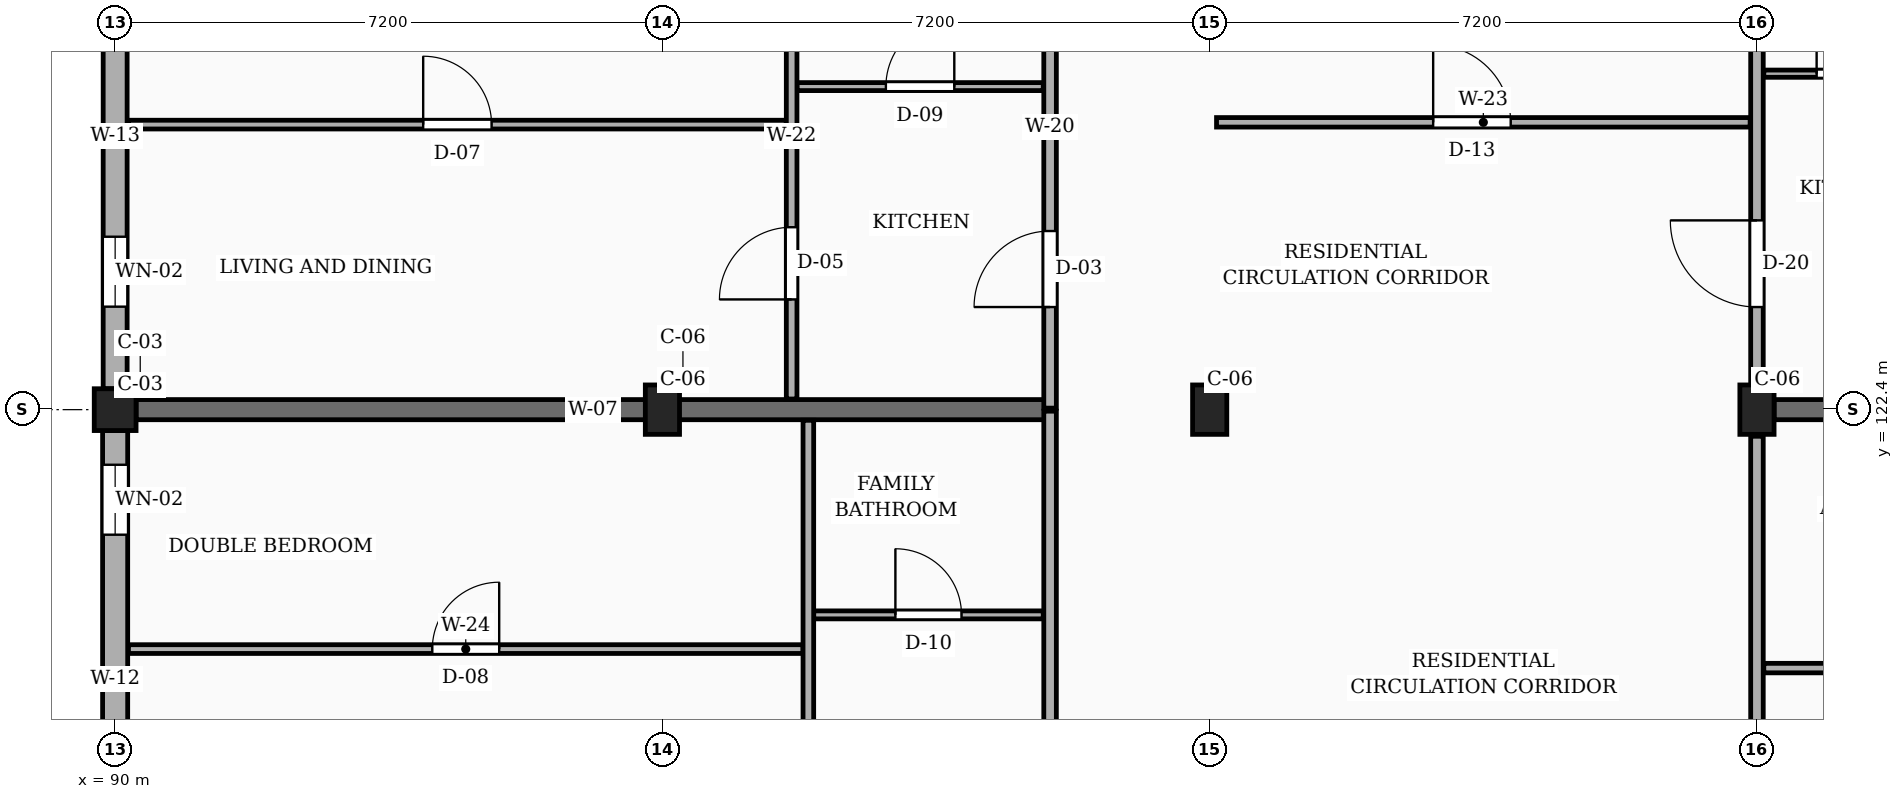
"""IFC4 building model, lengths in metres.
Left out: names, types, materials, properties, quantities, classifications, styles, units other than length and angle.
Written with IfcOpenShell. Run it as: python <this file> out.ifc"""

import sys

from ifc_helpers import new_model, si_unit, direction, frame, frame_2d, origin, origin_2d, place, context, subcontext, project, spatial, rectangle, extrude, element, fill, save


model = new_model("IFC4")
c1 = context("Model", 3, precision=1e-05, world=origin(), true_north=direction((0.0, 1.0)))
c2 = subcontext(c1, "Body", "Model", "MODEL_VIEW")
j1 = project(units=[si_unit("LENGTHUNIT", "METRE"), si_unit("PLANEANGLEUNIT", "RADIAN")], contexts=[c1])
p1 = place(None, origin())
s1 = spatial("IfcSite", under=j1, at=p1, CompositionType="ELEMENT")
p2 = place(p1, origin())
s2 = spatial("IfcBuilding", under=s1, at=p2, CompositionType="ELEMENT")
p3 = place(p2, frame((0.0, 0.0, 10.8)))
s3 = spatial("IfcBuildingStorey", under=s2, at=p3, CompositionType="ELEMENT", Elevation=10.8)
p4 = place(p3, frame((90.0, 122.4, 0.0), z_axis=(0.0, 0.0, 1.0), x_axis=(1.0, 0.0, 0.0)))
e1 = element("IfcColumn", 1, at=p4, inside=s3, PredefinedType="COLUMN", context=c2, shape_type="SweptSolid", body=[
    extrude(rectangle(XDim=0.55, YDim=0.55, at=origin_2d()), origin(), (0.0, 0.0, 1.0), 3.15),
])
for number, where, z_axis, x_axis in (
    (2, (97.2, 122.4, 0.0), (0.0, 0.0, 1.0), (1.0, 0.0, 0.0)),
    (3, (104.4, 122.4, 0.0), (0.0, 0.0, 1.0), (1.0, 0.0, 0.0)),
    (4, (111.6, 122.4, 0.0), (0.0, 0.0, 1.0), (1.0, 0.0, 0.0)),
):
    element("IfcColumn", number, at=place(p3, frame(where, z_axis=z_axis, x_axis=x_axis)), inside=s3, PredefinedType="COLUMN", context=c2, shape_type="SweptSolid", body=[
        extrude(rectangle(XDim=0.45, YDim=0.65, at=origin_2d()), origin(), (0.0, 0.0, 1.0), 3.15),
    ])
p5 = place(p3, frame((90.275, 122.4, 0.0), z_axis=(0.0, 0.0, 1.0), x_axis=(1.0, 0.0, 0.0)))
e5 = element("IfcWall", 5, at=p5, inside=s3, PredefinedType="SOLIDWALL", context=c2, shape_type="SweptSolid", body=[
    extrude(rectangle(XDim=12.025, YDim=0.265, at=frame_2d((6.013, 0.0))), origin(), (0.0, 0.0, 1.0), 2.19),
])
p6 = place(p3, frame((111.825, 122.4, 0.0), z_axis=(0.0, 0.0, 1.0), x_axis=(1.0, 0.0, 0.0)))
e6 = element("IfcWall", 6, at=p6, inside=s3, PredefinedType="SOLIDWALL", context=c2, shape_type="SweptSolid", body=[
    extrude(rectangle(XDim=6.7, YDim=0.265, at=frame_2d((3.35, 0.0))), origin(), (0.0, 0.0, 1.0), 2.19),
])
p7 = place(p3, frame((90.0, 129.325, 0.0), z_axis=(0.0, 0.0, 1.0), x_axis=(0.0, -1.0, 0.0)))
e7 = element("IfcWall", 7, at=p7, inside=s3, PredefinedType="SOLIDWALL", context=c2, shape_type="SweptSolid", body=[
    extrude(rectangle(XDim=6.65, YDim=0.315, at=frame_2d((3.325, 0.0))), origin(), (0.0, 0.0, 1.0), 2.46),
])
p8 = place(p7, frame((0.45, 0.0, 0.78)))
e8 = element("IfcOpeningElement", 8, at=p8, cuts=e7, PredefinedType="OPENING", context=c2, shape_type="SweptSolid", body=[
    extrude(rectangle(XDim=1.45, YDim=1.44, at=frame_2d((0.725, 0.72))), frame((0.0, 0.167, 0.0), z_axis=(0.0, -1.0, 0.0), x_axis=(1.0, 0.0, 0.0)), (0.0, 0.0, 1.0), 0.335),
])
p9 = place(p7, frame((4.65, 0.0, 0.78)))
e9 = element("IfcOpeningElement", 9, at=p9, cuts=e7, PredefinedType="OPENING", context=c2, shape_type="SweptSolid", body=[
    extrude(rectangle(XDim=0.92, YDim=1.15, at=frame_2d((0.46, 0.575))), frame((0.0, 0.167, 0.0), z_axis=(0.0, -1.0, 0.0), x_axis=(1.0, 0.0, 0.0)), (0.0, 0.0, 1.0), 0.335),
])
p10 = place(p3, frame((90.0, 122.125, 0.0), z_axis=(0.0, 0.0, 1.0), x_axis=(0.0, -1.0, 0.0)))
e10 = element("IfcWall", 10, at=p10, inside=s3, PredefinedType="SOLIDWALL", context=c2, shape_type="SweptSolid", body=[
    extrude(rectangle(XDim=6.65, YDim=0.33, at=frame_2d((3.325, 0.0))), origin(), (0.0, 0.0, 1.0), 2.46),
])
p11 = place(p10, frame((0.45, 0.0, 0.78)))
e11 = element("IfcOpeningElement", 11, at=p11, cuts=e10, PredefinedType="OPENING", context=c2, shape_type="SweptSolid", body=[
    extrude(rectangle(XDim=0.92, YDim=1.15, at=frame_2d((0.46, 0.575))), frame((0.0, 0.175, 0.0), z_axis=(0.0, -1.0, 0.0), x_axis=(1.0, 0.0, 0.0)), (0.0, 0.0, 1.0), 0.35),
])
p12 = place(p10, frame((4.65, 0.0, 0.78)))
e12 = element("IfcOpeningElement", 12, at=p12, cuts=e10, PredefinedType="OPENING", context=c2, shape_type="SweptSolid", body=[
    extrude(rectangle(XDim=1.08, YDim=1.15, at=frame_2d((0.54, 0.575))), frame((0.0, 0.175, 0.0), z_axis=(0.0, -1.0, 0.0), x_axis=(1.0, 0.0, 0.0)), (0.0, 0.0, 1.0), 0.35),
])
p13 = place(p3, frame((102.3, 115.22, 0.0), z_axis=(0.0, 0.0, 1.0), x_axis=(0.0, 1.0, 0.0)))
e13 = element("IfcWall", 13, at=p13, inside=s3, PredefinedType="PARTITIONING", context=c2, shape_type="SweptSolid", body=[
    extrude(rectangle(XDim=7.16, YDim=0.165, at=frame_2d((3.58, 0.0))), origin(), (0.0, 0.0, 1.0), 2.325),
])
p14 = place(p13, frame((1.33, 0.0, 0.0)))
e14 = element("IfcOpeningElement", 14, at=p14, cuts=e13, PredefinedType="OPENING", context=c2, shape_type="SweptSolid", body=[
    extrude(rectangle(XDim=1.14, YDim=2.18, at=frame_2d((0.57, 1.09))), frame((0.0, 0.093, 0.0), z_axis=(0.0, -1.0, 0.0), x_axis=(1.0, 0.0, 0.0)), (0.0, 0.0, 1.0), 0.185),
])
p15 = place(p3, frame((102.3, 122.42, 0.0), z_axis=(0.0, 0.0, 1.0), x_axis=(0.0, 1.0, 0.0)))
e15 = element("IfcWall", 15, at=p15, inside=s3, PredefinedType="PARTITIONING", context=c2, shape_type="SweptSolid", body=[
    extrude(rectangle(XDim=7.16, YDim=0.165, at=frame_2d((3.58, 0.0))), origin(), (0.0, 0.0, 1.0), 2.325),
])
p16 = place(p15, frame((1.33, 0.0, 0.0)))
e16 = element("IfcOpeningElement", 16, at=p16, cuts=e15, PredefinedType="OPENING", context=c2, shape_type="SweptSolid", body=[
    extrude(rectangle(XDim=1.0, YDim=2.15, at=frame_2d((0.5, 1.075))), frame((0.0, 0.093, 0.0), z_axis=(0.0, -1.0, 0.0), x_axis=(1.0, 0.0, 0.0)), (0.0, 0.0, 1.0), 0.185),
])
p17 = place(p3, frame((111.6, 115.55, 0.0), z_axis=(0.0, 0.0, 1.0), x_axis=(0.0, 1.0, 0.0)))
e17 = element("IfcWall", 17, at=p17, inside=s3, PredefinedType="PARTITIONING", context=c2, shape_type="SweptSolid", body=[
    extrude(rectangle(XDim=6.5, YDim=0.165, at=frame_2d((3.25, 0.0))), origin(), (0.0, 0.0, 1.0), 2.24),
])
p18 = place(p17, frame((1.1, 0.0, 0.0)))
e18 = element("IfcOpeningElement", 18, at=p18, cuts=e17, PredefinedType="OPENING", context=c2, shape_type="SweptSolid", body=[
    extrude(rectangle(XDim=0.94, YDim=2.12, at=frame_2d((0.47, 1.06))), frame((0.0, 0.093, 0.0), z_axis=(0.0, -1.0, 0.0), x_axis=(1.0, 0.0, 0.0)), (0.0, 0.0, 1.0), 0.185),
])
p19 = place(p3, frame((111.6, 122.75, 0.0), z_axis=(0.0, 0.0, 1.0), x_axis=(0.0, 1.0, 0.0)))
e19 = element("IfcWall", 19, at=p19, inside=s3, PredefinedType="PARTITIONING", context=c2, shape_type="SweptSolid", body=[
    extrude(rectangle(XDim=6.5, YDim=0.165, at=frame_2d((3.25, 0.0))), origin(), (0.0, 0.0, 1.0), 2.24),
])
p20 = place(p19, frame((1.0, 0.0, 0.0)))
e20 = element("IfcOpeningElement", 20, at=p20, cuts=e19, PredefinedType="OPENING", context=c2, shape_type="SweptSolid", body=[
    extrude(rectangle(XDim=1.14, YDim=2.18, at=frame_2d((0.57, 1.09))), frame((0.0, 0.093, 0.0), z_axis=(0.0, -1.0, 0.0), x_axis=(1.0, 0.0, 0.0)), (0.0, 0.0, 1.0), 0.185),
])
p21 = place(p3, frame((90.175, 119.25, 0.0), z_axis=(0.0, 0.0, 1.0), x_axis=(1.0, 0.0, 0.0)))
e21 = element("IfcWall", 21, at=p21, inside=s3, PredefinedType="PARTITIONING", context=c2, shape_type="SweptSolid", body=[
    extrude(rectangle(XDim=8.875, YDim=0.115, at=frame_2d((4.438, 0.0))), origin(), (0.0, 0.0, 1.0), 2.325),
])
p22 = place(p21, frame((3.998, 0.0, 0.0)))
e22 = element("IfcOpeningElement", 22, at=p22, cuts=e21, PredefinedType="OPENING", context=c2, shape_type="SweptSolid", body=[
    extrude(rectangle(XDim=0.88, YDim=2.08, at=frame_2d((0.44, 1.04))), frame((0.0, 0.067, 0.0), z_axis=(0.0, -1.0, 0.0), x_axis=(1.0, 0.0, 0.0)), (0.0, 0.0, 1.0), 0.135),
])
p23 = place(p3, frame((99.19, 119.7, 0.0), z_axis=(0.0, 0.0, 1.0), x_axis=(1.0, 0.0, 0.0)))
e23 = element("IfcWall", 23, at=p23, inside=s3, PredefinedType="PARTITIONING", context=c2, shape_type="SweptSolid", body=[
    extrude(rectangle(XDim=3.02, YDim=0.105, at=frame_2d((1.51, 0.0))), origin(), (0.0, 0.0, 1.0), 2.325),
])
p24 = place(p23, frame((1.075, 0.0, 0.0)))
e24 = element("IfcOpeningElement", 24, at=p24, cuts=e23, PredefinedType="OPENING", context=c2, shape_type="SweptSolid", body=[
    extrude(rectangle(XDim=0.87, YDim=2.05, at=frame_2d((0.435, 1.025))), frame((0.0, 0.062, 0.0), z_axis=(0.0, -1.0, 0.0), x_axis=(1.0, 0.0, 0.0)), (0.0, 0.0, 1.0), 0.125),
])
p25 = place(p3, frame((99.12, 115.34, 0.0), z_axis=(0.0, 0.0, 1.0), x_axis=(0.0, 1.0, 0.0)))
e25 = element("IfcWall", 25, at=p25, inside=s3, PredefinedType="PARTITIONING", context=c2, shape_type="SweptSolid", body=[
    extrude(rectangle(XDim=6.92, YDim=0.14, at=frame_2d((3.46, 0.0))), origin(), (0.0, 0.0, 1.0), 2.325),
])
p26 = place(p25, frame((1.31, 0.0, 0.0)))
e26 = element("IfcOpeningElement", 26, at=p26, cuts=e25, PredefinedType="OPENING", context=c2, shape_type="SweptSolid", body=[
    extrude(rectangle(XDim=0.92, YDim=2.1, at=frame_2d((0.46, 1.05))), frame((0.0, 0.08, 0.0), z_axis=(0.0, -1.0, 0.0), x_axis=(1.0, 0.0, 0.0)), (0.0, 0.0, 1.0), 0.16),
])
p27 = place(p3, frame((111.69, 119.0, 0.0), z_axis=(0.0, 0.0, 1.0), x_axis=(1.0, 0.0, 0.0)))
e27 = element("IfcWall", 27, at=p27, inside=s3, PredefinedType="PARTITIONING", context=c2, shape_type="SweptSolid", body=[
    extrude(rectangle(XDim=6.935, YDim=0.125, at=frame_2d((3.468, 0.0))), origin(), (0.0, 0.0, 1.0), 2.325),
])
p28 = place(p27, frame((1.1, 0.0, 0.0)))
e28 = element("IfcOpeningElement", 28, at=p28, cuts=e27, PredefinedType="OPENING", context=c2, shape_type="SweptSolid", body=[
    extrude(rectangle(XDim=0.87, YDim=2.05, at=frame_2d((0.435, 1.025))), frame((0.0, 0.073, 0.0), z_axis=(0.0, -1.0, 0.0), x_axis=(1.0, 0.0, 0.0)), (0.0, 0.0, 1.0), 0.145),
])
p29 = place(p27, frame((4.5, 0.0, 0.0)))
e29 = element("IfcOpeningElement", 29, at=p29, cuts=e27, PredefinedType="OPENING", context=c2, shape_type="SweptSolid", body=[
    extrude(rectangle(XDim=0.92, YDim=2.1, at=frame_2d((0.46, 1.05))), frame((0.0, 0.073, 0.0), z_axis=(0.0, -1.0, 0.0), x_axis=(1.0, 0.0, 0.0)), (0.0, 0.0, 1.0), 0.145),
])
p30 = place(p3, frame((104.49, 126.18, 0.0), z_axis=(0.0, 0.0, 1.0), x_axis=(1.0, 0.0, 0.0)))
e30 = element("IfcWall", 30, at=p30, inside=s3, PredefinedType="PARTITIONING", context=c2, shape_type="SweptSolid", body=[
    extrude(rectangle(XDim=7.02, YDim=0.125, at=frame_2d((3.51, 0.0))), origin(), (0.0, 0.0, 1.0), 2.325),
])
p31 = place(p30, frame((2.85, 0.0, 0.0)))
e31 = element("IfcOpeningElement", 31, at=p31, cuts=e30, PredefinedType="OPENING", context=c2, shape_type="SweptSolid", body=[
    extrude(rectangle(XDim=1.02, YDim=2.15, at=frame_2d((0.51, 1.075))), frame((0.0, 0.073, 0.0), z_axis=(0.0, -1.0, 0.0), x_axis=(1.0, 0.0, 0.0)), (0.0, 0.0, 1.0), 0.145),
])
p32 = place(p3, frame((90.175, 126.15, 0.0), z_axis=(0.0, 0.0, 1.0), x_axis=(1.0, 0.0, 0.0)))
e32 = element("IfcWall", 32, at=p32, inside=s3, PredefinedType="PARTITIONING", context=c2, shape_type="SweptSolid", body=[
    extrude(rectangle(XDim=8.655, YDim=0.115, at=frame_2d((4.328, 0.0))), origin(), (0.0, 0.0, 1.0), 2.325),
])
p33 = place(p32, frame((3.877, 0.0, 0.0)))
e33 = element("IfcOpeningElement", 33, at=p33, cuts=e32, PredefinedType="OPENING", context=c2, shape_type="SweptSolid", body=[
    extrude(rectangle(XDim=0.9, YDim=2.1, at=frame_2d((0.45, 1.05))), frame((0.0, 0.067, 0.0), z_axis=(0.0, -1.0, 0.0), x_axis=(1.0, 0.0, 0.0)), (0.0, 0.0, 1.0), 0.135),
])
p34 = place(p3, frame((98.97, 126.65, 0.0), z_axis=(0.0, 0.0, 1.0), x_axis=(1.0, 0.0, 0.0)))
e34 = element("IfcWall", 34, at=p34, inside=s3, PredefinedType="PARTITIONING", context=c2, shape_type="SweptSolid", body=[
    extrude(rectangle(XDim=3.24, YDim=0.105, at=frame_2d((1.62, 0.0))), origin(), (0.0, 0.0, 1.0), 2.325),
])
p35 = place(p34, frame((1.17, 0.0, 0.0)))
e35 = element("IfcOpeningElement", 35, at=p35, cuts=e34, PredefinedType="OPENING", context=c2, shape_type="SweptSolid", body=[
    extrude(rectangle(XDim=0.9, YDim=2.05, at=frame_2d((0.45, 1.025))), frame((0.0, 0.062, 0.0), z_axis=(0.0, -1.0, 0.0), x_axis=(1.0, 0.0, 0.0)), (0.0, 0.0, 1.0), 0.125),
])
p36 = place(p3, frame((98.9, 122.54, 0.0), z_axis=(0.0, 0.0, 1.0), x_axis=(0.0, 1.0, 0.0)))
e36 = element("IfcWall", 36, at=p36, inside=s3, PredefinedType="PARTITIONING", context=c2, shape_type="SweptSolid", body=[
    extrude(rectangle(XDim=6.92, YDim=0.14, at=frame_2d((3.46, 0.0))), origin(), (0.0, 0.0, 1.0), 2.325),
])
p37 = place(p36, frame((1.31, 0.0, 0.0)))
e37 = element("IfcOpeningElement", 37, at=p37, cuts=e36, PredefinedType="OPENING", context=c2, shape_type="SweptSolid", body=[
    extrude(rectangle(XDim=0.95, YDim=2.1, at=frame_2d((0.475, 1.05))), frame((0.0, 0.08, 0.0), z_axis=(0.0, -1.0, 0.0), x_axis=(1.0, 0.0, 0.0)), (0.0, 0.0, 1.0), 0.16),
])
p38 = place(p3, frame((111.69, 126.82, 0.0), z_axis=(0.0, 0.0, 1.0), x_axis=(1.0, 0.0, 0.0)))
e38 = element("IfcWall", 38, at=p38, inside=s3, PredefinedType="PARTITIONING", context=c2, shape_type="SweptSolid", body=[
    extrude(rectangle(XDim=2.26, YDim=0.095, at=frame_2d((1.13, 0.0))), origin(), (0.0, 0.0, 1.0), 2.325),
])
p39 = place(p38, frame((0.695, 0.0, 0.0)))
e39 = element("IfcOpeningElement", 39, at=p39, cuts=e38, PredefinedType="OPENING", context=c2, shape_type="SweptSolid", body=[
    extrude(rectangle(XDim=0.87, YDim=2.05, at=frame_2d((0.435, 1.025))), frame((0.0, 0.058, 0.0), z_axis=(0.0, -1.0, 0.0), x_axis=(1.0, 0.0, 0.0)), (0.0, 0.0, 1.0), 0.115),
])
p40 = place(p9, origin())
e40 = element("IfcWindow", 40, at=p40, inside=s3, PartitioningType="SINGLE_PANEL", PredefinedType="WINDOW", context=c2, shape_type="SweptSolid", body=[
    extrude(rectangle(XDim=0.92, YDim=1.15, at=frame_2d((0.46, 0.575))), frame((0.0, 0.03, 0.0), z_axis=(0.0, -1.0, 0.0), x_axis=(1.0, 0.0, 0.0)), (0.0, 0.0, 1.0), 0.06),
])
fill(e9, e40)
p41 = place(p11, origin())
e41 = element("IfcWindow", 41, at=p41, inside=s3, PartitioningType="SINGLE_PANEL", PredefinedType="WINDOW", context=c2, shape_type="SweptSolid", body=[
    extrude(rectangle(XDim=0.92, YDim=1.15, at=frame_2d((0.46, 0.575))), frame((0.0, 0.03, 0.0), z_axis=(0.0, -1.0, 0.0), x_axis=(1.0, 0.0, 0.0)), (0.0, 0.0, 1.0), 0.06),
])
fill(e11, e41)
p42 = place(p16, origin())
e42 = element("IfcDoor", 42, at=p42, inside=s3, OperationType="SINGLE_SWING_LEFT", PredefinedType="DOOR", context=c2, shape_type="SweptSolid", body=[
    extrude(rectangle(XDim=1.0, YDim=2.15, at=frame_2d((0.5, 1.075))), frame((0.0, 0.025, 0.0), z_axis=(0.0, -1.0, 0.0), x_axis=(1.0, 0.0, 0.0)), (0.0, 0.0, 1.0), 0.05),
])
fill(e16, e42)
p43 = place(p20, origin())
e43 = element("IfcDoor", 43, at=p43, inside=s3, OperationType="SINGLE_SWING_RIGHT", PredefinedType="DOOR", context=c2, shape_type="SweptSolid", body=[
    extrude(rectangle(XDim=1.14, YDim=2.18, at=frame_2d((0.57, 1.09))), frame((0.0, 0.025, 0.0), z_axis=(0.0, -1.0, 0.0), x_axis=(1.0, 0.0, 0.0)), (0.0, 0.0, 1.0), 0.05),
])
fill(e20, e43)
p44 = place(p22, origin())
e44 = element("IfcDoor", 44, at=p44, inside=s3, OperationType="SINGLE_SWING_RIGHT", PredefinedType="DOOR", context=c2, shape_type="SweptSolid", body=[
    extrude(rectangle(XDim=0.88, YDim=2.08, at=frame_2d((0.44, 1.04))), frame((0.0, 0.025, 0.0), z_axis=(0.0, -1.0, 0.0), x_axis=(1.0, 0.0, 0.0)), (0.0, 0.0, 1.0), 0.05),
])
fill(e22, e44)
p45 = place(p24, origin())
e45 = element("IfcDoor", 45, at=p45, inside=s3, OperationType="SINGLE_SWING_LEFT", PredefinedType="DOOR", context=c2, shape_type="SweptSolid", body=[
    extrude(rectangle(XDim=0.87, YDim=2.05, at=frame_2d((0.435, 1.025))), frame((0.0, 0.025, 0.0), z_axis=(0.0, -1.0, 0.0), x_axis=(1.0, 0.0, 0.0)), (0.0, 0.0, 1.0), 0.05),
])
fill(e24, e45)
p46 = place(p31, origin())
e46 = element("IfcDoor", 46, at=p46, inside=s3, OperationType="SINGLE_SWING_LEFT", PredefinedType="DOOR", context=c2, shape_type="SweptSolid", body=[
    extrude(rectangle(XDim=1.02, YDim=2.15, at=frame_2d((0.51, 1.075))), frame((0.0, 0.025, 0.0), z_axis=(0.0, -1.0, 0.0), x_axis=(1.0, 0.0, 0.0)), (0.0, 0.0, 1.0), 0.05),
])
fill(e31, e46)
p47 = place(p33, origin())
e47 = element("IfcDoor", 47, at=p47, inside=s3, OperationType="SINGLE_SWING_LEFT", PredefinedType="DOOR", context=c2, shape_type="SweptSolid", body=[
    extrude(rectangle(XDim=0.9, YDim=2.1, at=frame_2d((0.45, 1.05))), frame((0.0, 0.025, 0.0), z_axis=(0.0, -1.0, 0.0), x_axis=(1.0, 0.0, 0.0)), (0.0, 0.0, 1.0), 0.05),
])
fill(e33, e47)
p48 = place(p35, origin())
e48 = element("IfcDoor", 48, at=p48, inside=s3, OperationType="SINGLE_SWING_RIGHT", PredefinedType="DOOR", context=c2, shape_type="SweptSolid", body=[
    extrude(rectangle(XDim=0.9, YDim=2.05, at=frame_2d((0.45, 1.025))), frame((0.0, 0.025, 0.0), z_axis=(0.0, -1.0, 0.0), x_axis=(1.0, 0.0, 0.0)), (0.0, 0.0, 1.0), 0.05),
])
fill(e35, e48)
p49 = place(p37, origin())
e49 = element("IfcDoor", 49, at=p49, inside=s3, OperationType="SINGLE_SWING_LEFT", PredefinedType="DOOR", context=c2, shape_type="SweptSolid", body=[
    extrude(rectangle(XDim=0.95, YDim=2.1, at=frame_2d((0.475, 1.05))), frame((0.0, 0.025, 0.0), z_axis=(0.0, -1.0, 0.0), x_axis=(1.0, 0.0, 0.0)), (0.0, 0.0, 1.0), 0.05),
])
fill(e37, e49)
p50 = place(p39, origin())
e50 = element("IfcDoor", 50, at=p50, inside=s3, OperationType="SINGLE_SWING_LEFT", PredefinedType="DOOR", context=c2, shape_type="SweptSolid", body=[
    extrude(rectangle(XDim=0.87, YDim=2.05, at=frame_2d((0.435, 1.025))), frame((0.0, 0.025, 0.0), z_axis=(0.0, -1.0, 0.0), x_axis=(1.0, 0.0, 0.0)), (0.0, 0.0, 1.0), 0.05),
])
fill(e39, e50)
save(model, sys.argv[1])
